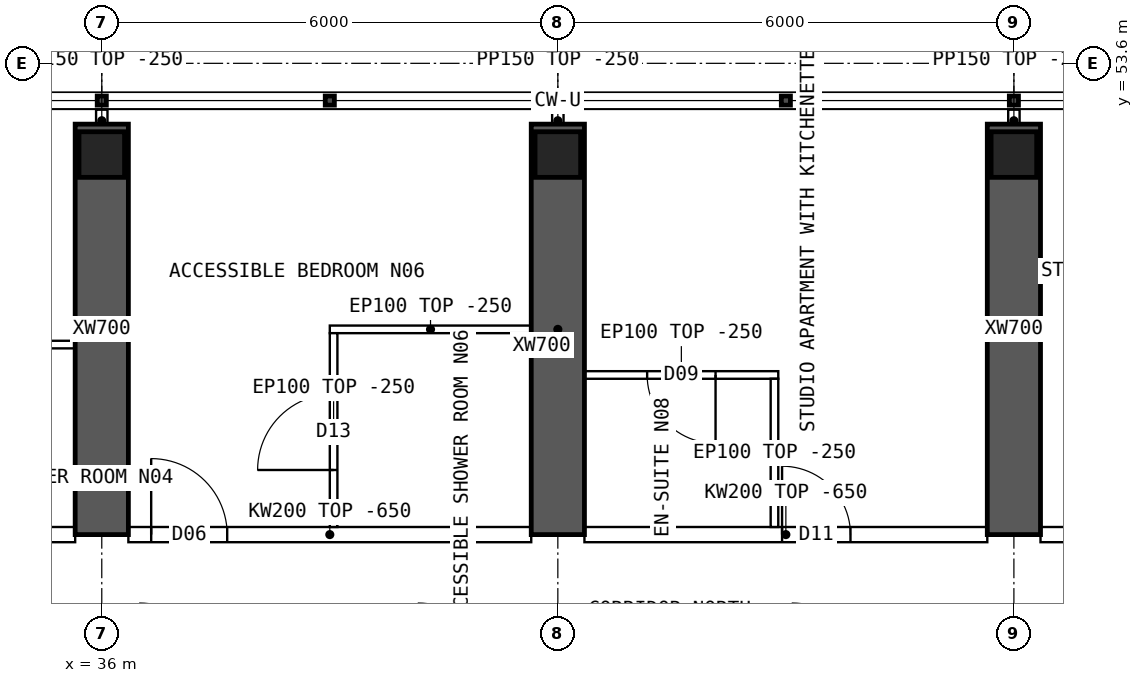
"""IFC4 building model, lengths in metres.
Left out: names, types, materials, properties, quantities, classifications, styles, units other than length and angle.
Written with IfcOpenShell. Run it as: python <this file> out.ifc"""

import sys

from ifc_helpers import new_model, si_unit, direction, frame, frame_2d, origin, origin_2d, place, context, subcontext, project, spatial, polyline, rectangle, hollow_rectangle, outline, extrude, element, fill, save


model = new_model("IFC4")
c1 = context("Model", 3, precision=1e-05, world=origin(), true_north=direction((0.0, 1.0)))
c2 = subcontext(c1, "Body", "Model", "MODEL_VIEW")
j1 = project(units=[si_unit("LENGTHUNIT", "METRE"), si_unit("PLANEANGLEUNIT", "RADIAN")], contexts=[c1])
p1 = place(None, origin())
s1 = spatial("IfcSite", under=j1, at=p1, CompositionType="ELEMENT")
p2 = place(p1, origin())
s2 = spatial("IfcBuilding", under=s1, at=p2, CompositionType="ELEMENT")
p3 = place(p2, frame((0.0, 0.0, 224.05)))
s3 = spatial("IfcBuildingStorey", under=s2, at=p3, CompositionType="ELEMENT", Elevation=224.05)
for number, where, z_axis, x_axis in (
    (1, (36.0, 52.4, 0.0), (0.0, 0.0, 1.0), (1.0, 0.0, 0.0)),
    (2, (42.0, 52.4, 0.0), (0.0, 0.0, 1.0), (1.0, 0.0, 0.0)),
    (3, (48.0, 52.4, 0.0), (0.0, 0.0, 1.0), (1.0, 0.0, 0.0)),
):
    element("IfcColumn", number, at=place(p3, frame(where, z_axis=z_axis, x_axis=x_axis)), inside=s3, PredefinedType="COLUMN", context=c2, shape_type="SweptSolid", body=[
        extrude(hollow_rectangle(XDim=0.6, YDim=0.6, WallThickness=0.06, at=origin_2d()), origin(), (0.0, 0.0, 1.0), 3.75),
    ])
for number, where, z_axis, x_axis in (
    (4, (36.0, 47.4, 0.0), (0.0, 0.0, 1.0), (0.0, 1.0, 0.0)),
    (5, (42.0, 47.4, 0.0), (0.0, 0.0, 1.0), (0.0, 1.0, 0.0)),
    (6, (48.0, 47.4, 0.0), (0.0, 0.0, 1.0), (0.0, 1.0, 0.0)),
):
    element("IfcWall", number, at=place(p3, frame(where, z_axis=z_axis, x_axis=x_axis)), inside=s3, PredefinedType="SHEAR", context=c2, shape_type="SweptSolid", body=[
        extrude(rectangle(XDim=5.4, YDim=0.7, at=frame_2d((2.7, 0.0))), origin(), (0.0, 0.0, 1.0), 3.75),
    ])
p4 = place(p3, frame((30.35, 47.4, 0.0), z_axis=(0.0, 0.0, 1.0), x_axis=(1.0, 0.0, 0.0)))
e7 = element("IfcWall", 7, at=p4, inside=s3, PredefinedType="SOLIDWALL", context=c2, shape_type="SweptSolid", body=[
    extrude(outline(polyline([(0.0, 0.0), (5.3, 0.0), (5.3, 3.1), (0.0, 3.1), (0.0, 0.0)])), frame((0.0, 0.1, 0.0), z_axis=(0.0, -1.0, 0.0), x_axis=(1.0, 0.0, 0.0)), (0.0, 0.0, 1.0), 0.2),
])
p5 = place(p4, frame((2.3, 0.0, 0.0)))
e8 = element("IfcOpeningElement", 8, at=p5, cuts=e7, PredefinedType="OPENING", context=c2, shape_type="SweptSolid", body=[
    extrude(rectangle(XDim=0.9, YDim=2.1, at=frame_2d((0.45, 1.05))), frame((0.0, 0.11, 0.0), z_axis=(0.0, -1.0, 0.0), x_axis=(1.0, 0.0, 0.0)), (0.0, 0.0, 1.0), 0.22),
])
p6 = place(p3, frame((36.35, 47.4, 0.0), z_axis=(0.0, 0.0, 1.0), x_axis=(1.0, 0.0, 0.0)))
e9 = element("IfcWall", 9, at=p6, inside=s3, PredefinedType="SOLIDWALL", context=c2, shape_type="SweptSolid", body=[
    extrude(outline(polyline([(0.0, 0.0), (5.3, 0.0), (5.3, 3.1), (0.0, 3.1), (0.0, 0.0)])), frame((0.0, 0.1, 0.0), z_axis=(0.0, -1.0, 0.0), x_axis=(1.0, 0.0, 0.0)), (0.0, 0.0, 1.0), 0.2),
])
p7 = place(p6, frame((0.3, 0.0, 0.0)))
e10 = element("IfcOpeningElement", 10, at=p7, cuts=e9, PredefinedType="OPENING", context=c2, shape_type="SweptSolid", body=[
    extrude(rectangle(XDim=1.0, YDim=2.1, at=frame_2d((0.5, 1.05))), frame((0.0, 0.11, 0.0), z_axis=(0.0, -1.0, 0.0), x_axis=(1.0, 0.0, 0.0)), (0.0, 0.0, 1.0), 0.22),
])
p8 = place(p3, frame((42.35, 47.4, 0.0), z_axis=(0.0, 0.0, 1.0), x_axis=(1.0, 0.0, 0.0)))
e11 = element("IfcWall", 11, at=p8, inside=s3, PredefinedType="SOLIDWALL", context=c2, shape_type="SweptSolid", body=[
    extrude(outline(polyline([(0.0, 0.0), (5.3, 0.0), (5.3, 3.1), (0.0, 3.1), (0.0, 0.0)])), frame((0.0, 0.1, 0.0), z_axis=(0.0, -1.0, 0.0), x_axis=(1.0, 0.0, 0.0)), (0.0, 0.0, 1.0), 0.2),
])
p9 = place(p8, frame((2.6, 0.0, 0.0)))
e12 = element("IfcOpeningElement", 12, at=p9, cuts=e11, PredefinedType="OPENING", context=c2, shape_type="SweptSolid", body=[
    extrude(rectangle(XDim=0.9, YDim=2.1, at=frame_2d((0.45, 1.05))), frame((0.0, 0.11, 0.0), z_axis=(0.0, -1.0, 0.0), x_axis=(1.0, 0.0, 0.0)), (0.0, 0.0, 1.0), 0.22),
])
p10 = place(p3, frame((48.35, 47.4, 0.0), z_axis=(0.0, 0.0, 1.0), x_axis=(1.0, 0.0, 0.0)))
e13 = element("IfcWall", 13, at=p10, inside=s3, PredefinedType="SOLIDWALL", context=c2, shape_type="SweptSolid", body=[
    extrude(outline(polyline([(0.0, 0.0), (5.3, 0.0), (5.3, 3.1), (0.0, 3.1), (0.0, 0.0)])), frame((0.0, 0.1, 0.0), z_axis=(0.0, -1.0, 0.0), x_axis=(1.0, 0.0, 0.0)), (0.0, 0.0, 1.0), 0.2),
])
p11 = place(p10, frame((2.3, 0.0, 0.0)))
e14 = element("IfcOpeningElement", 14, at=p11, cuts=e13, PredefinedType="OPENING", context=c2, shape_type="SweptSolid", body=[
    extrude(rectangle(XDim=0.9, YDim=2.1, at=frame_2d((0.45, 1.05))), frame((0.0, 0.11, 0.0), z_axis=(0.0, -1.0, 0.0), x_axis=(1.0, 0.0, 0.0)), (0.0, 0.0, 1.0), 0.22),
])
p12 = place(p3, frame((32.5, 49.9, 0.0), z_axis=(0.0, 0.0, 1.0), x_axis=(1.0, 0.0, 0.0)))
e15 = element("IfcWall", 15, at=p12, inside=s3, PredefinedType="PARTITIONING", context=c2, shape_type="SweptSolid", body=[
    extrude(rectangle(XDim=3.15, YDim=0.1, at=frame_2d((1.575, 0.0))), origin(), (0.0, 0.0, 1.0), 3.5),
])
p13 = place(p12, frame((0.25, 0.0, 0.0)))
e16 = element("IfcOpeningElement", 16, at=p13, cuts=e15, PredefinedType="OPENING", context=c2, shape_type="SweptSolid", body=[
    extrude(rectangle(XDim=0.8, YDim=2.1, at=frame_2d((0.4, 1.05))), frame((0.0, 0.06, 0.0), z_axis=(0.0, -1.0, 0.0), x_axis=(1.0, 0.0, 0.0)), (0.0, 0.0, 1.0), 0.12),
])
p14 = place(p3, frame((39.0, 50.1, 0.0), z_axis=(0.0, 0.0, 1.0), x_axis=(1.0, 0.0, 0.0)))
e17 = element("IfcWall", 17, at=p14, inside=s3, PredefinedType="PARTITIONING", context=c2, shape_type="SweptSolid", body=[
    extrude(rectangle(XDim=2.65, YDim=0.1, at=frame_2d((1.325, 0.0))), origin(), (0.0, 0.0, 1.0), 3.5),
])
p15 = place(p3, frame((39.05, 50.05, 0.0), z_axis=(0.0, 0.0, 1.0), x_axis=(0.0, -1.0, 0.0)))
e18 = element("IfcWall", 18, at=p15, inside=s3, PredefinedType="PARTITIONING", context=c2, shape_type="SweptSolid", body=[
    extrude(outline(polyline([(0.0, 0.0), (2.55, 0.0), (2.55, 3.1), (2.502, 3.1), (2.5, 3.5), (0.0, 3.5), (0.0, 0.0)])), frame((0.0, 0.05, 0.0), z_axis=(0.0, -1.0, 0.0), x_axis=(1.0, 0.0, 0.0)), (0.0, 0.0, 1.0), 0.1),
])
p16 = place(p15, frame((0.8, 0.0, 0.0)))
e19 = element("IfcOpeningElement", 19, at=p16, cuts=e18, PredefinedType="OPENING", context=c2, shape_type="SweptSolid", body=[
    extrude(rectangle(XDim=1.0, YDim=2.1, at=frame_2d((0.5, 1.05))), frame((0.0, 0.06, 0.0), z_axis=(0.0, -1.0, 0.0), x_axis=(1.0, 0.0, 0.0)), (0.0, 0.0, 1.0), 0.12),
])
p17 = place(p3, frame((42.35, 49.5, 0.0), z_axis=(0.0, 0.0, 1.0), x_axis=(1.0, 0.0, 0.0)))
e20 = element("IfcWall", 20, at=p17, inside=s3, PredefinedType="PARTITIONING", context=c2, shape_type="SweptSolid", body=[
    extrude(rectangle(XDim=2.55, YDim=0.1, at=frame_2d((1.275, 0.0))), origin(), (0.0, 0.0, 1.0), 3.5),
])
p18 = place(p17, frame((0.825, 0.0, 0.0)))
e21 = element("IfcOpeningElement", 21, at=p18, cuts=e20, PredefinedType="OPENING", context=c2, shape_type="SweptSolid", body=[
    extrude(rectangle(XDim=0.9, YDim=2.1, at=frame_2d((0.45, 1.05))), frame((0.0, 0.06, 0.0), z_axis=(0.0, -1.0, 0.0), x_axis=(1.0, 0.0, 0.0)), (0.0, 0.0, 1.0), 0.12),
])
p19 = place(p3, frame((44.85, 49.45, 0.0), z_axis=(0.0, 0.0, 1.0), x_axis=(0.0, -1.0, 0.0)))
e22 = element("IfcWall", 22, at=p19, inside=s3, PredefinedType="PARTITIONING", context=c2, shape_type="SweptSolid", body=[
    extrude(outline(polyline([(0.0, 0.0), (1.95, 0.0), (1.95, 3.1), (1.902, 3.1), (1.9, 3.5), (0.0, 3.5), (0.0, 0.0)])), frame((0.0, 0.05, 0.0), z_axis=(0.0, -1.0, 0.0), x_axis=(1.0, 0.0, 0.0)), (0.0, 0.0, 1.0), 0.1),
])
for number, where, z_axis, x_axis in (
    (23, (36.0, 52.7, 0.0), (0.0, 0.0, 1.0), (0.0, 1.0, 0.0)),
    (24, (42.0, 52.7, 0.0), (0.0, 0.0, 1.0), (0.0, 1.0, 0.0)),
    (25, (48.0, 52.7, 0.0), (0.0, 0.0, 1.0), (0.0, 1.0, 0.0)),
):
    element("IfcWall", number, at=place(p3, frame(where, z_axis=z_axis, x_axis=x_axis)), inside=s3, PredefinedType="PARTITIONING", context=c2, shape_type="SweptSolid", body=[
        extrude(rectangle(XDim=0.29, YDim=0.15, at=frame_2d((0.145, 0.0))), origin(), (0.0, 0.0, 1.0), 3.5),
    ])
p20 = place(p16, origin())
e26 = element("IfcDoor", 26, at=p20, inside=s3, OperationType="SINGLE_SWING_RIGHT", PredefinedType="DOOR", context=c2, shape_type="SweptSolid", body=[
    extrude(rectangle(XDim=1.0, YDim=2.1, at=frame_2d((0.5, 1.05))), frame((0.0, 0.025, 0.0), z_axis=(0.0, -1.0, 0.0), x_axis=(1.0, 0.0, 0.0)), (0.0, 0.0, 1.0), 0.05),
])
fill(e19, e26)
p21 = place(p7, origin())
e27 = element("IfcDoor", 27, at=p21, inside=s3, OperationType="SINGLE_SWING_LEFT", PredefinedType="DOOR", context=c2, shape_type="SweptSolid", body=[
    extrude(rectangle(XDim=1.0, YDim=2.1, at=frame_2d((0.5, 1.05))), frame((0.0, 0.025, 0.0), z_axis=(0.0, -1.0, 0.0), x_axis=(1.0, 0.0, 0.0)), (0.0, 0.0, 1.0), 0.05),
])
fill(e10, e27)
p22 = place(p18, origin())
e28 = element("IfcDoor", 28, at=p22, inside=s3, OperationType="SINGLE_SWING_RIGHT", PredefinedType="DOOR", context=c2, shape_type="SweptSolid", body=[
    extrude(rectangle(XDim=0.9, YDim=2.1, at=frame_2d((0.45, 1.05))), frame((0.0, 0.025, 0.0), z_axis=(0.0, -1.0, 0.0), x_axis=(1.0, 0.0, 0.0)), (0.0, 0.0, 1.0), 0.05),
])
fill(e21, e28)
p23 = place(p9, origin())
e29 = element("IfcDoor", 29, at=p23, inside=s3, OperationType="SINGLE_SWING_LEFT", PredefinedType="DOOR", context=c2, shape_type="SweptSolid", body=[
    extrude(rectangle(XDim=0.9, YDim=2.1, at=frame_2d((0.45, 1.05))), frame((0.0, 0.025, 0.0), z_axis=(0.0, -1.0, 0.0), x_axis=(1.0, 0.0, 0.0)), (0.0, 0.0, 1.0), 0.05),
])
fill(e12, e29)
save(model, sys.argv[1])
